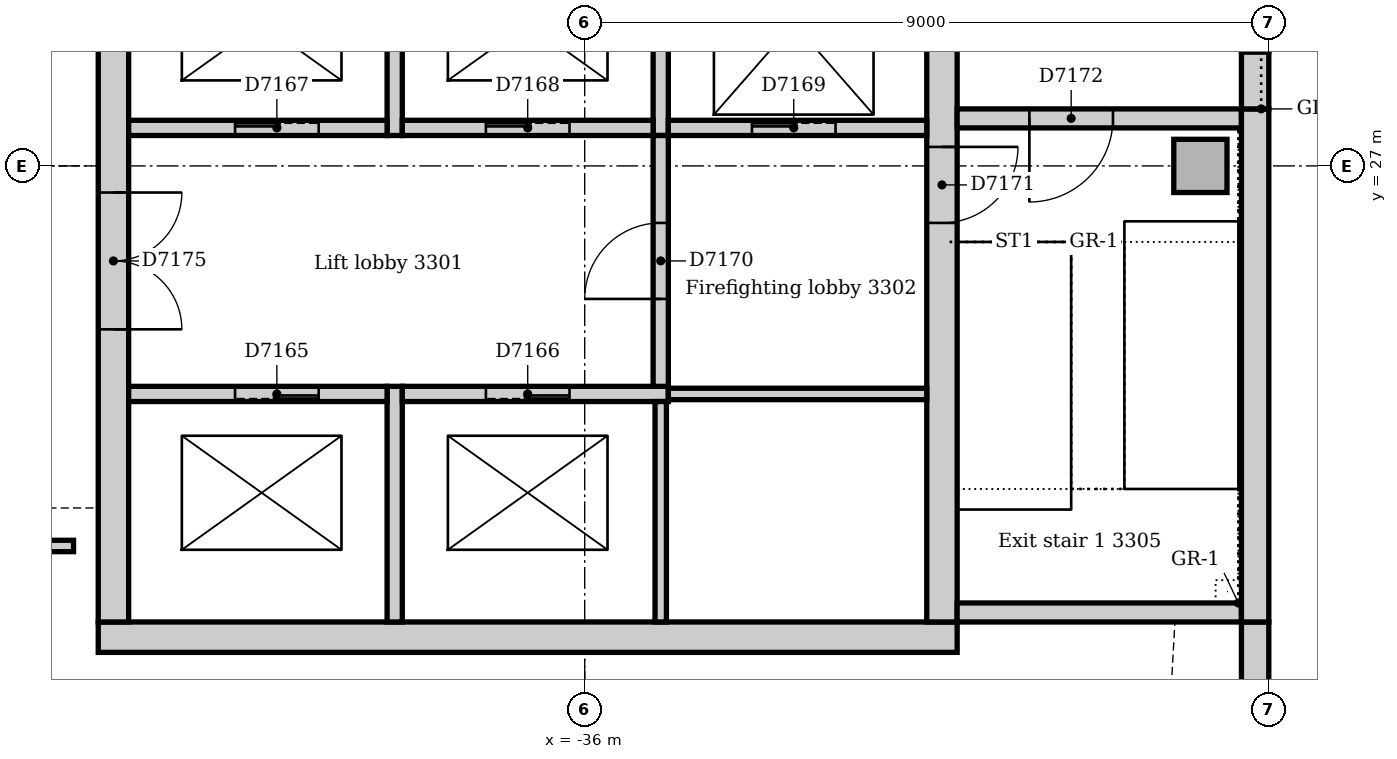
"""IFC4 building model, lengths in metres.
Left out: names, types, materials, properties, quantities, classifications, styles, units other than length and angle.
Written with IfcOpenShell. Run it as: python <this file> out.ifc"""

import sys

from ifc_helpers import new_model, si_unit, direction, frame, frame_2d, origin, origin_2d, place, context, subcontext, project, spatial, rectangle, extrude, element, fill, save


model = new_model("IFC4")
c1 = context("Model", 3, precision=1e-05, world=origin(), true_north=direction((0.0, 1.0)))
c2 = subcontext(c1, "Body", "Model", "MODEL_VIEW")
j1 = project(units=[si_unit("LENGTHUNIT", "METRE"), si_unit("PLANEANGLEUNIT", "RADIAN")], contexts=[c1])
p1 = place(None, origin())
s1 = spatial("IfcSite", under=j1, at=p1, CompositionType="ELEMENT")
p2 = place(p1, origin())
s2 = spatial("IfcBuilding", under=s1, at=p2, CompositionType="ELEMENT")
p3 = place(p2, frame((0.0, 0.0, 140.0)))
s3 = spatial("IfcBuildingStorey", under=s2, at=p3, CompositionType="ELEMENT", Elevation=140.0)
p4 = place(p3, frame((-42.4, 20.8, 0.0), z_axis=(0.0, 0.0, 1.0), x_axis=(1.0, 0.0, 0.0)))
e1 = element("IfcWall", 1, at=p4, inside=s3, PredefinedType="SOLIDWALL", context=c2, shape_type="SweptSolid", body=[
    extrude(rectangle(XDim=11.3, YDim=0.4, at=frame_2d((5.65, 0.0))), origin(), (0.0, 0.0, 1.0), 3.7),
])
p5 = place(p3, frame((-31.3, 21.0, 0.0), z_axis=(0.0, 0.0, 1.0), x_axis=(0.0, 1.0, 0.0)))
e2 = element("IfcWall", 2, at=p5, inside=s3, PredefinedType="SOLIDWALL", context=c2, shape_type="SweptSolid", body=[
    extrude(rectangle(XDim=9.5, YDim=0.4, at=frame_2d((4.75, 0.0))), origin(), (0.0, 0.0, 1.0), 3.7),
])
p6 = place(p5, frame((5.25, 0.0, 0.0)))
e3 = element("IfcOpeningElement", 3, at=p6, cuts=e2, PredefinedType="OPENING", context=c2, shape_type="SweptSolid", body=[
    extrude(rectangle(XDim=1.0, YDim=2.1, at=frame_2d((0.5, 1.05))), frame((0.0, 0.21, 0.0), z_axis=(0.0, -1.0, 0.0), x_axis=(1.0, 0.0, 0.0)), (0.0, 0.0, 1.0), 0.42),
])
p7 = place(p3, frame((-42.2, 30.5, 0.0), z_axis=(0.0, 0.0, 1.0), x_axis=(0.0, -1.0, 0.0)))
e4 = element("IfcWall", 4, at=p7, inside=s3, PredefinedType="SOLIDWALL", context=c2, shape_type="SweptSolid", body=[
    extrude(rectangle(XDim=9.5, YDim=0.4, at=frame_2d((4.75, 0.0))), origin(), (0.0, 0.0, 1.0), 3.7),
])
p8 = place(p7, frame((3.85, 0.0, 0.0)))
e5 = element("IfcOpeningElement", 5, at=p8, cuts=e4, PredefinedType="OPENING", context=c2, shape_type="SweptSolid", body=[
    extrude(rectangle(XDim=1.8, YDim=2.1, at=frame_2d((0.9, 1.05))), frame((0.0, 0.21, 0.0), z_axis=(0.0, -1.0, 0.0), x_axis=(1.0, 0.0, 0.0)), (0.0, 0.0, 1.0), 0.42),
])
p9 = place(p3, frame((-31.1, 21.125, 0.0), z_axis=(0.0, 0.0, 1.0), x_axis=(1.0, 0.0, 0.0)))
e6 = element("IfcWall", 6, at=p9, inside=s3, PredefinedType="SOLIDWALL", context=c2, shape_type="SweptSolid", body=[
    extrude(rectangle(XDim=3.74, YDim=0.25, at=frame_2d((1.87, 0.0))), origin(), (0.0, 0.0, 1.0), 3.7),
])
p10 = place(p3, frame((-27.36, 27.625, 0.0), z_axis=(0.0, 0.0, 1.0), x_axis=(-1.0, 0.0, 0.0)))
e7 = element("IfcWall", 7, at=p10, inside=s3, PredefinedType="SOLIDWALL", context=c2, shape_type="SweptSolid", body=[
    extrude(rectangle(XDim=3.74, YDim=0.25, at=frame_2d((1.87, 0.0))), origin(), (0.0, 0.0, 1.0), 3.7),
])
p11 = place(p10, frame((1.69, 0.0, 0.0)))
e8 = element("IfcOpeningElement", 8, at=p11, cuts=e7, PredefinedType="OPENING", context=c2, shape_type="SweptSolid", body=[
    extrude(rectangle(XDim=1.1, YDim=2.1, at=frame_2d((0.55, 1.05))), frame((0.0, 0.135, 0.0), z_axis=(0.0, -1.0, 0.0), x_axis=(1.0, 0.0, 0.0)), (0.0, 0.0, 1.0), 0.27),
])
p12 = place(p3, frame((-27.9, 27.0, 0.0), z_axis=(0.0, 0.0, 1.0), x_axis=(1.0, 0.0, 0.0)))
e9 = element("IfcColumn", 9, at=p12, inside=s3, PredefinedType="COLUMN", context=c2, shape_type="SweptSolid", body=[
    extrude(rectangle(XDim=0.7, YDim=0.7, at=origin_2d()), origin(), (0.0, 0.0, 1.0), 4.0),
])
p13 = place(p3, frame((-27.18, 17.743, 0.0), z_axis=(0.0, 0.0, 1.0), x_axis=(0.0, 1.0, 0.0)))
e10 = element("IfcWall", 10, at=p13, inside=s3, PredefinedType="STANDARD", context=c2, shape_type="SweptSolid", body=[
    extrude(rectangle(XDim=3.257, YDim=0.36, at=frame_2d((1.629, 0.0))), origin(), (0.0, 0.0, 1.0), 3.7),
])
p14 = place(p3, frame((-27.18, 21.0, 0.0), z_axis=(0.0, 0.0, 1.0), x_axis=(0.0, 1.0, 0.0)))
e11 = element("IfcWall", 11, at=p14, inside=s3, PredefinedType="STANDARD", context=c2, shape_type="SweptSolid", body=[
    extrude(rectangle(XDim=6.75, YDim=0.36, at=frame_2d((3.375, 0.0))), origin(), (0.0, 0.0, 1.0), 3.7),
])
p15 = place(p3, frame((-27.18, 27.75, 0.0), z_axis=(0.0, 0.0, 1.0), x_axis=(0.0, 1.0, 0.0)))
e12 = element("IfcWall", 12, at=p15, inside=s3, PredefinedType="STANDARD", context=c2, shape_type="SweptSolid", body=[
    extrude(rectangle(XDim=0.75, YDim=0.36, at=frame_2d((0.375, 0.0))), origin(), (0.0, 0.0, 1.0), 3.7),
])
p16 = place(p3, frame((-38.5, 21.0, 0.0), z_axis=(0.0, 0.0, 1.0), x_axis=(0.0, 1.0, 0.0)))
e13 = element("IfcWall", 13, at=p16, inside=s3, PredefinedType="SOLIDWALL", context=c2, shape_type="SweptSolid", body=[
    extrude(rectangle(XDim=3.1, YDim=0.2, at=frame_2d((1.55, 0.0))), origin(), (0.0, 0.0, 1.0), 3.55),
])
p17 = place(p3, frame((-38.6, 24.0, 0.0), z_axis=(0.0, 0.0, 1.0), x_axis=(-1.0, 0.0, 0.0)))
e14 = element("IfcWall", 14, at=p17, inside=s3, PredefinedType="SOLIDWALL", context=c2, shape_type="SweptSolid", body=[
    extrude(rectangle(XDim=3.4, YDim=0.2, at=frame_2d((1.7, 0.0))), origin(), (0.0, 0.0, 1.0), 3.55),
])
p18 = place(p17, frame((0.9, 0.0, 0.0)))
e15 = element("IfcOpeningElement", 15, at=p18, cuts=e14, PredefinedType="OPENING", context=c2, shape_type="SweptSolid", body=[
    extrude(rectangle(XDim=1.1, YDim=2.1, at=frame_2d((0.55, 1.05))), frame((0.0, 0.11, 0.0), z_axis=(0.0, -1.0, 0.0), x_axis=(1.0, 0.0, 0.0)), (0.0, 0.0, 1.0), 0.22),
])
p19 = place(p3, frame((-34.9, 24.0, 0.0), z_axis=(0.0, 0.0, 1.0), x_axis=(-1.0, 0.0, 0.0)))
e16 = element("IfcWall", 16, at=p19, inside=s3, PredefinedType="SOLIDWALL", context=c2, shape_type="SweptSolid", body=[
    extrude(rectangle(XDim=3.5, YDim=0.2, at=frame_2d((1.75, 0.0))), origin(), (0.0, 0.0, 1.0), 3.55),
])
p20 = place(p19, frame((1.3, 0.0, 0.0)))
e17 = element("IfcOpeningElement", 17, at=p20, cuts=e16, PredefinedType="OPENING", context=c2, shape_type="SweptSolid", body=[
    extrude(rectangle(XDim=1.1, YDim=2.1, at=frame_2d((0.55, 1.05))), frame((0.0, 0.11, 0.0), z_axis=(0.0, -1.0, 0.0), x_axis=(1.0, 0.0, 0.0)), (0.0, 0.0, 1.0), 0.22),
])
p21 = place(p3, frame((-38.5, 27.4, 0.0), z_axis=(0.0, 0.0, 1.0), x_axis=(0.0, 1.0, 0.0)))
e18 = element("IfcWall", 18, at=p21, inside=s3, PredefinedType="SOLIDWALL", context=c2, shape_type="SweptSolid", body=[
    extrude(rectangle(XDim=2.85, YDim=0.2, at=frame_2d((1.425, 0.0))), origin(), (0.0, 0.0, 1.0), 3.55),
])
p22 = place(p3, frame((-42.0, 27.5, 0.0), z_axis=(0.0, 0.0, 1.0), x_axis=(1.0, 0.0, 0.0)))
e19 = element("IfcWall", 19, at=p22, inside=s3, PredefinedType="SOLIDWALL", context=c2, shape_type="SweptSolid", body=[
    extrude(rectangle(XDim=3.4, YDim=0.2, at=frame_2d((1.7, 0.0))), origin(), (0.0, 0.0, 1.0), 3.55),
])
p23 = place(p22, frame((1.4, 0.0, 0.0)))
e20 = element("IfcOpeningElement", 20, at=p23, cuts=e19, PredefinedType="OPENING", context=c2, shape_type="SweptSolid", body=[
    extrude(rectangle(XDim=1.1, YDim=2.1, at=frame_2d((0.55, 1.05))), frame((0.0, 0.11, 0.0), z_axis=(0.0, -1.0, 0.0), x_axis=(1.0, 0.0, 0.0)), (0.0, 0.0, 1.0), 0.22),
])
p24 = place(p3, frame((-35.0, 27.4, 0.0), z_axis=(0.0, 0.0, 1.0), x_axis=(0.0, 1.0, 0.0)))
e21 = element("IfcWall", 21, at=p24, inside=s3, PredefinedType="SOLIDWALL", context=c2, shape_type="SweptSolid", body=[
    extrude(rectangle(XDim=2.85, YDim=0.2, at=frame_2d((1.425, 0.0))), origin(), (0.0, 0.0, 1.0), 3.55),
])
p25 = place(p3, frame((-38.4, 27.5, 0.0), z_axis=(0.0, 0.0, 1.0), x_axis=(1.0, 0.0, 0.0)))
e22 = element("IfcWall", 22, at=p25, inside=s3, PredefinedType="SOLIDWALL", context=c2, shape_type="SweptSolid", body=[
    extrude(rectangle(XDim=3.3, YDim=0.2, at=frame_2d((1.65, 0.0))), origin(), (0.0, 0.0, 1.0), 3.55),
])
p26 = place(p25, frame((1.1, 0.0, 0.0)))
e23 = element("IfcOpeningElement", 23, at=p26, cuts=e22, PredefinedType="OPENING", context=c2, shape_type="SweptSolid", body=[
    extrude(rectangle(XDim=1.1, YDim=2.1, at=frame_2d((0.55, 1.05))), frame((0.0, 0.11, 0.0), z_axis=(0.0, -1.0, 0.0), x_axis=(1.0, 0.0, 0.0)), (0.0, 0.0, 1.0), 0.22),
])
p27 = place(p3, frame((-34.9, 27.5, 0.0), z_axis=(0.0, 0.0, 1.0), x_axis=(1.0, 0.0, 0.0)))
e24 = element("IfcWall", 24, at=p27, inside=s3, PredefinedType="SOLIDWALL", context=c2, shape_type="SweptSolid", body=[
    extrude(rectangle(XDim=3.4, YDim=0.2, at=frame_2d((1.7, 0.0))), origin(), (0.0, 0.0, 1.0), 3.55),
])
p28 = place(p27, frame((1.1, 0.0, 0.0)))
e25 = element("IfcOpeningElement", 25, at=p28, cuts=e24, PredefinedType="OPENING", context=c2, shape_type="SweptSolid", body=[
    extrude(rectangle(XDim=1.1, YDim=2.1, at=frame_2d((0.55, 1.05))), frame((0.0, 0.11, 0.0), z_axis=(0.0, -1.0, 0.0), x_axis=(1.0, 0.0, 0.0)), (0.0, 0.0, 1.0), 0.22),
])
p29 = place(p3, frame((-35.0, 24.1, 0.0), z_axis=(0.0, 0.0, 1.0), x_axis=(0.0, 1.0, 0.0)))
e26 = element("IfcWall", 26, at=p29, inside=s3, PredefinedType="SOLIDWALL", context=c2, shape_type="SweptSolid", body=[
    extrude(rectangle(XDim=3.3, YDim=0.2, at=frame_2d((1.65, 0.0))), origin(), (0.0, 0.0, 1.0), 3.55),
])
p30 = place(p29, frame((1.15, 0.0, 0.0)))
e27 = element("IfcOpeningElement", 27, at=p30, cuts=e26, PredefinedType="OPENING", context=c2, shape_type="SweptSolid", body=[
    extrude(rectangle(XDim=1.0, YDim=2.1, at=frame_2d((0.5, 1.05))), frame((0.0, 0.11, 0.0), z_axis=(0.0, -1.0, 0.0), x_axis=(1.0, 0.0, 0.0)), (0.0, 0.0, 1.0), 0.22),
])
p31 = place(p3, frame((-35.0, 21.0, 0.0), z_axis=(0.0, 0.0, 1.0), x_axis=(0.0, 1.0, 0.0)))
e28 = element("IfcWall", 28, at=p31, inside=s3, PredefinedType="SOLIDWALL", context=c2, shape_type="SweptSolid", body=[
    extrude(rectangle(XDim=2.9, YDim=0.15, at=frame_2d((1.45, 0.0))), origin(), (0.0, 0.0, 1.0), 3.55),
])
p32 = place(p3, frame((-31.5, 24.0, 0.0), z_axis=(0.0, 0.0, 1.0), x_axis=(-1.0, 0.0, 0.0)))
e29 = element("IfcWall", 29, at=p32, inside=s3, PredefinedType="SOLIDWALL", context=c2, shape_type="SweptSolid", body=[
    extrude(rectangle(XDim=3.4, YDim=0.15, at=frame_2d((1.7, 0.0))), origin(), (0.0, 0.0, 1.0), 3.55),
])
p33 = place(p3, frame((-59.766, 22.0, 0.0), z_axis=(0.0, 0.0, 1.0), x_axis=(1.0, 0.0, 0.0)))
e30 = element("IfcWall", 30, at=p33, inside=s3, PredefinedType="PARTITIONING", context=c2, shape_type="SweptSolid", body=[
    extrude(rectangle(XDim=17.041, YDim=0.15, at=frame_2d((8.52, 0.0))), origin(), (0.0, 0.0, 1.0), 3.55),
])
p34 = place(p33, frame((15.366, 0.0, 0.0)))
e31 = element("IfcOpeningElement", 31, at=p34, cuts=e30, PredefinedType="OPENING", context=c2, shape_type="SweptSolid", body=[
    extrude(rectangle(XDim=0.9, YDim=2.1, at=frame_2d((0.45, 1.05))), frame((0.0, 0.085, 0.0), z_axis=(0.0, -1.0, 0.0), x_axis=(1.0, 0.0, 0.0)), (0.0, 0.0, 1.0), 0.17),
])
p35 = place(p33, frame((2.5, 0.0, 0.0)))
e32 = element("IfcOpeningElement", 32, at=p35, cuts=e30, PredefinedType="OPENING", context=c2, shape_type="SweptSolid", body=[
    extrude(rectangle(XDim=0.9, YDim=2.1, at=frame_2d((0.45, 1.05))), frame((0.0, 0.085, 0.0), z_axis=(0.0, -1.0, 0.0), x_axis=(1.0, 0.0, 0.0)), (0.0, 0.0, 1.0), 0.17),
])
p36 = place(p33, frame((9.366, 0.0, 0.0)))
e33 = element("IfcOpeningElement", 33, at=p36, cuts=e30, PredefinedType="OPENING", context=c2, shape_type="SweptSolid", body=[
    extrude(rectangle(XDim=1.8, YDim=2.1, at=frame_2d((0.9, 1.05))), frame((0.0, 0.085, 0.0), z_axis=(0.0, -1.0, 0.0), x_axis=(1.0, 0.0, 0.0)), (0.0, 0.0, 1.0), 0.17),
])
p37 = place(p18, origin())
e34 = element("IfcDoor", 34, at=p37, inside=s3, OperationType="SLIDING_TO_LEFT", PredefinedType="DOOR", context=c2, shape_type="SweptSolid", body=[
    extrude(rectangle(XDim=1.1, YDim=2.1, at=frame_2d((0.55, 1.05))), frame((0.0, 0.025, 0.0), z_axis=(0.0, -1.0, 0.0), x_axis=(1.0, 0.0, 0.0)), (0.0, 0.0, 1.0), 0.05),
])
fill(e15, e34)
p38 = place(p20, origin())
e35 = element("IfcDoor", 35, at=p38, inside=s3, OperationType="SLIDING_TO_LEFT", PredefinedType="DOOR", context=c2, shape_type="SweptSolid", body=[
    extrude(rectangle(XDim=1.1, YDim=2.1, at=frame_2d((0.55, 1.05))), frame((0.0, 0.025, 0.0), z_axis=(0.0, -1.0, 0.0), x_axis=(1.0, 0.0, 0.0)), (0.0, 0.0, 1.0), 0.05),
])
fill(e17, e35)
p39 = place(p23, origin())
e36 = element("IfcDoor", 36, at=p39, inside=s3, OperationType="SLIDING_TO_LEFT", PredefinedType="DOOR", context=c2, shape_type="SweptSolid", body=[
    extrude(rectangle(XDim=1.1, YDim=2.1, at=frame_2d((0.55, 1.05))), frame((0.0, 0.025, 0.0), z_axis=(0.0, -1.0, 0.0), x_axis=(1.0, 0.0, 0.0)), (0.0, 0.0, 1.0), 0.05),
])
fill(e20, e36)
p40 = place(p26, origin())
e37 = element("IfcDoor", 37, at=p40, inside=s3, OperationType="SLIDING_TO_LEFT", PredefinedType="DOOR", context=c2, shape_type="SweptSolid", body=[
    extrude(rectangle(XDim=1.1, YDim=2.1, at=frame_2d((0.55, 1.05))), frame((0.0, 0.025, 0.0), z_axis=(0.0, -1.0, 0.0), x_axis=(1.0, 0.0, 0.0)), (0.0, 0.0, 1.0), 0.05),
])
fill(e23, e37)
p41 = place(p28, origin())
e38 = element("IfcDoor", 38, at=p41, inside=s3, OperationType="SLIDING_TO_LEFT", PredefinedType="DOOR", context=c2, shape_type="SweptSolid", body=[
    extrude(rectangle(XDim=1.1, YDim=2.1, at=frame_2d((0.55, 1.05))), frame((0.0, 0.025, 0.0), z_axis=(0.0, -1.0, 0.0), x_axis=(1.0, 0.0, 0.0)), (0.0, 0.0, 1.0), 0.05),
])
fill(e25, e38)
p42 = place(p30, origin())
e39 = element("IfcDoor", 39, at=p42, inside=s3, OperationType="SINGLE_SWING_LEFT", PredefinedType="DOOR", context=c2, shape_type="SweptSolid", body=[
    extrude(rectangle(XDim=1.0, YDim=2.1, at=frame_2d((0.5, 1.05))), frame((0.0, 0.025, 0.0), z_axis=(0.0, -1.0, 0.0), x_axis=(1.0, 0.0, 0.0)), (0.0, 0.0, 1.0), 0.05),
])
fill(e27, e39)
p43 = place(p6, frame((1.0, 0.0, 0.0), z_axis=(0.0, 0.0, 1.0), x_axis=(-1.0, 0.0, 0.0)))
e40 = element("IfcDoor", 40, at=p43, inside=s3, OperationType="SINGLE_SWING_LEFT", PredefinedType="DOOR", context=c2, shape_type="SweptSolid", body=[
    extrude(rectangle(XDim=1.0, YDim=2.1, at=frame_2d((0.5, 1.05))), frame((0.0, 0.025, 0.0), z_axis=(0.0, -1.0, 0.0), x_axis=(1.0, 0.0, 0.0)), (0.0, 0.0, 1.0), 0.05),
])
fill(e3, e40)
p44 = place(p11, origin())
e41 = element("IfcDoor", 41, at=p44, inside=s3, OperationType="SINGLE_SWING_RIGHT", PredefinedType="DOOR", context=c2, shape_type="SweptSolid", body=[
    extrude(rectangle(XDim=1.1, YDim=2.1, at=frame_2d((0.55, 1.05))), frame((0.0, 0.025, 0.0), z_axis=(0.0, -1.0, 0.0), x_axis=(1.0, 0.0, 0.0)), (0.0, 0.0, 1.0), 0.05),
])
fill(e8, e41)
p45 = place(p8, origin())
e42 = element("IfcDoor", 42, at=p45, inside=s3, OperationType="DOUBLE_DOOR_SINGLE_SWING", PredefinedType="DOOR", context=c2, shape_type="SweptSolid", body=[
    extrude(rectangle(XDim=1.8, YDim=2.1, at=frame_2d((0.9, 1.05))), frame((0.0, 0.025, 0.0), z_axis=(0.0, -1.0, 0.0), x_axis=(1.0, 0.0, 0.0)), (0.0, 0.0, 1.0), 0.05),
])
fill(e5, e42)
save(model, sys.argv[1])
